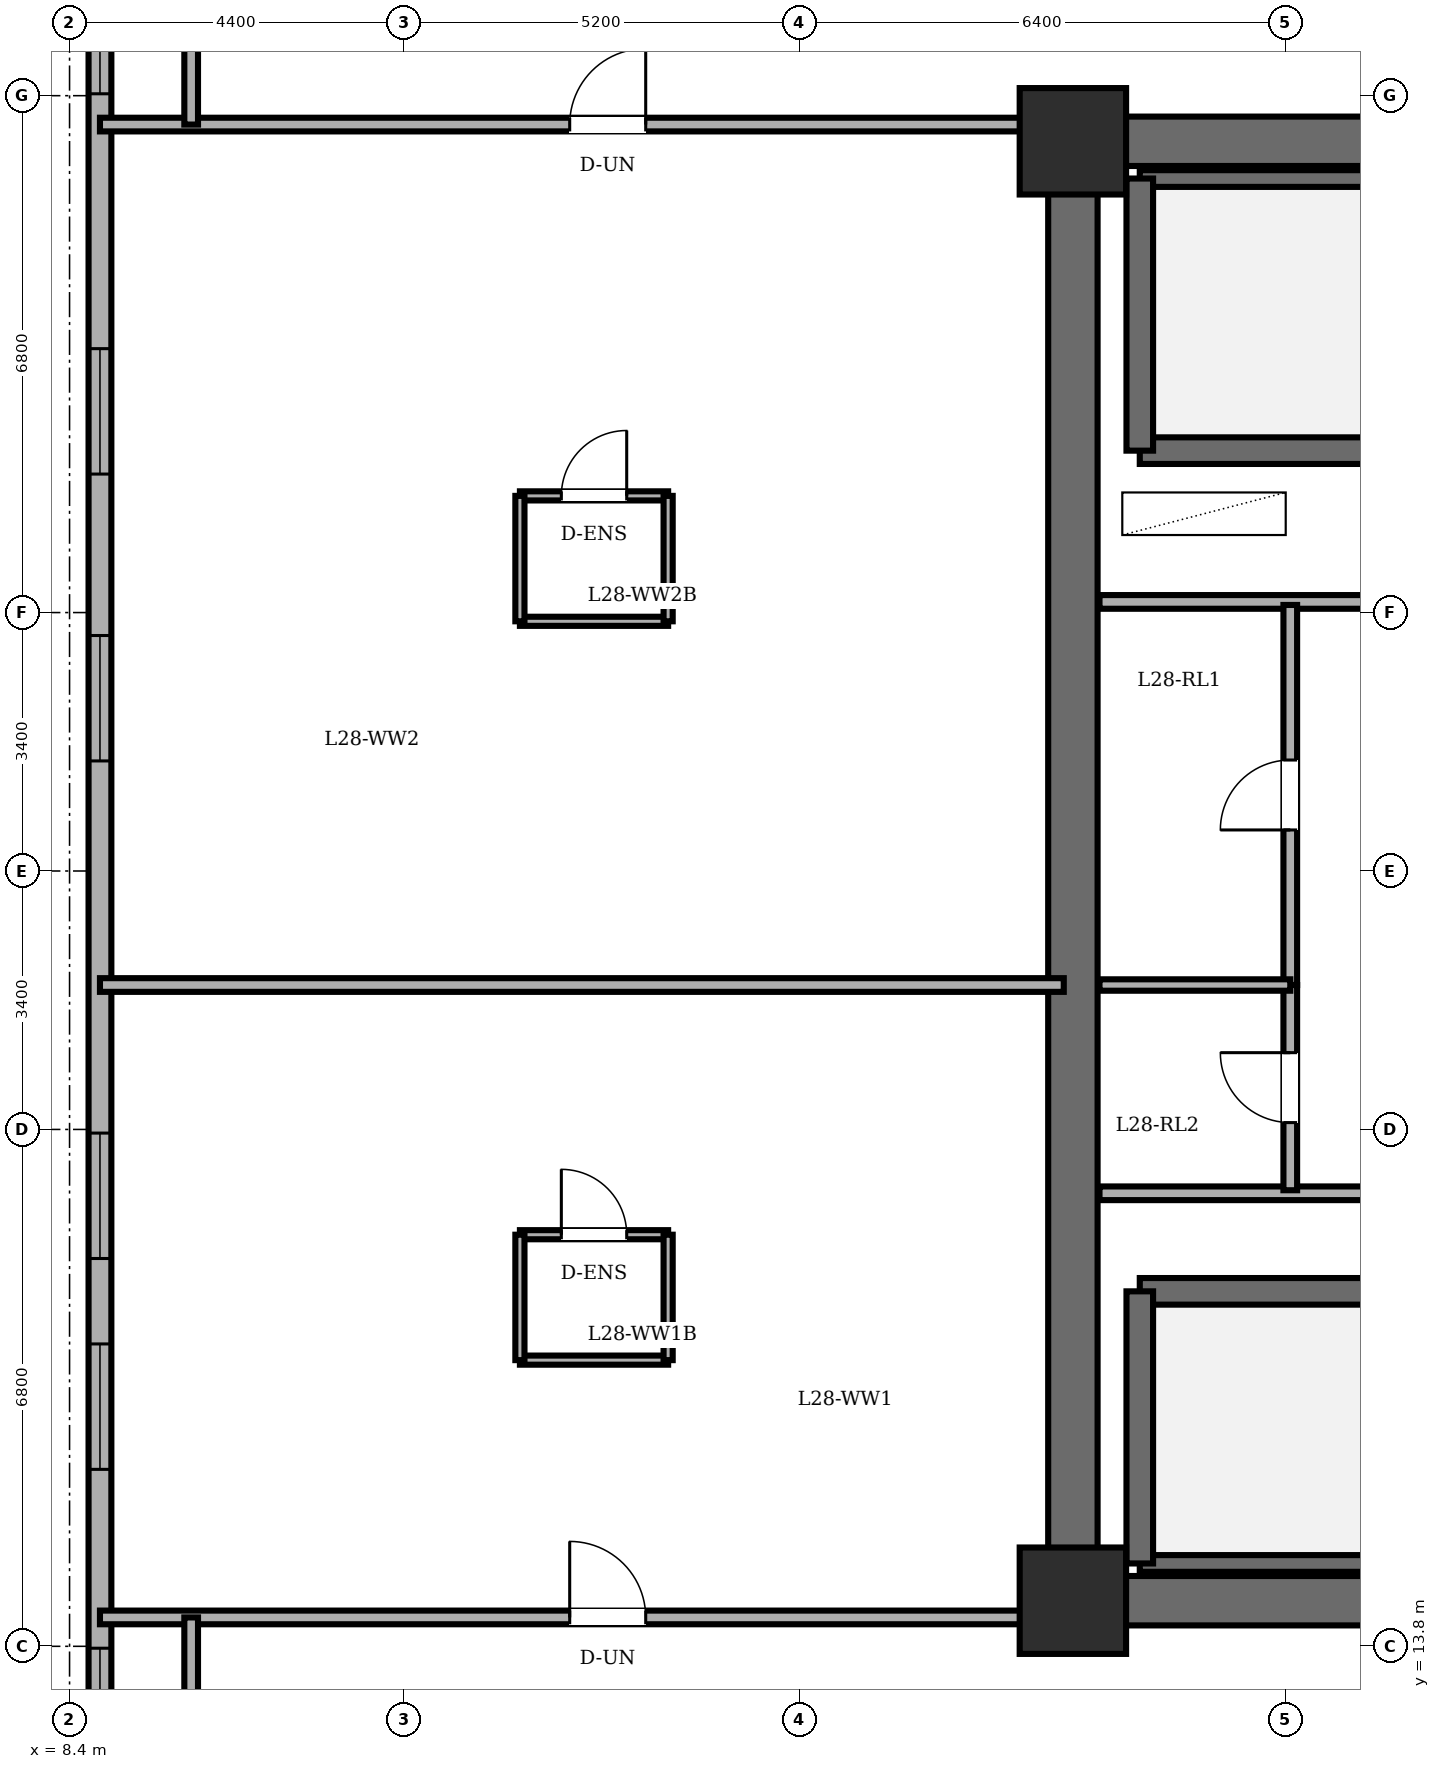
"""IFC4 building model, lengths in metres.
Left out: names, types, materials, properties, quantities, classifications, styles, units other than length and angle.
Written with IfcOpenShell. Run it as: python <this file> out.ifc"""

import sys

from ifc_helpers import new_model, si_unit, direction, frame, frame_2d, origin, origin_2d, place, context, subcontext, project, spatial, rectangle, extrude, element, fill, save


model = new_model("IFC4")
c1 = context("Model", 3, precision=1e-05, world=origin(), true_north=direction((0.0, 1.0)))
c2 = subcontext(c1, "Body", "Model", "MODEL_VIEW")
j1 = project(units=[si_unit("LENGTHUNIT", "METRE"), si_unit("PLANEANGLEUNIT", "RADIAN")], contexts=[c1])
p1 = place(None, origin())
s1 = spatial("IfcSite", under=j1, at=p1, CompositionType="ELEMENT")
p2 = place(p1, origin())
s2 = spatial("IfcBuilding", under=s1, at=p2, CompositionType="ELEMENT")
p3 = place(p2, frame((0.0, 0.0, 107.9)))
s3 = spatial("IfcBuildingStorey", under=s2, at=p3, CompositionType="ELEMENT", Elevation=107.9)
for number, where, z_axis, x_axis in (
    (1, (21.6, 14.4, 0.0), (0.0, 0.0, 1.0), (1.0, 0.0, 0.0)),
    (2, (21.6, 33.6, 0.0), (0.0, 0.0, 1.0), (1.0, 0.0, 0.0)),
):
    element("IfcColumn", number, at=place(p3, frame(where, z_axis=z_axis, x_axis=x_axis)), inside=s3, PredefinedType="COLUMN", context=c2, shape_type="SweptSolid", body=[
        extrude(rectangle(XDim=1.4, YDim=1.4, at=origin_2d()), origin(), (0.0, 0.0, 1.0), 3.6),
    ])
p4 = place(p3, frame((8.8, 38.2, 0.0), z_axis=(0.0, 0.0, 1.0), x_axis=(0.0, -1.0, 0.0)))
e3 = element("IfcWall", 3, at=p4, inside=s3, PredefinedType="SOLIDWALL", context=c2, shape_type="SweptSolid", body=[
    extrude(rectangle(XDim=28.4, YDim=0.3, at=frame_2d((14.2, 0.0))), origin(), (0.0, 0.0, 1.0), 3.4),
])
p5 = place(p4, frame((2.325, 0.0, 0.85)))
e4 = element("IfcOpeningElement", 4, at=p5, cuts=e3, PredefinedType="OPENING", context=c2, shape_type="SweptSolid", body=[
    extrude(rectangle(XDim=1.65, YDim=1.55, at=frame_2d((0.825, 0.775))), frame((0.0, 0.16, 0.0), z_axis=(0.0, -1.0, 0.0), x_axis=(1.0, 0.0, 0.0)), (0.0, 0.0, 1.0), 0.32),
])
p6 = place(p4, frame((7.328, 0.0, 0.85)))
e5 = element("IfcOpeningElement", 5, at=p6, cuts=e3, PredefinedType="OPENING", context=c2, shape_type="SweptSolid", body=[
    extrude(rectangle(XDim=1.65, YDim=1.55, at=frame_2d((0.825, 0.775))), frame((0.0, 0.16, 0.0), z_axis=(0.0, -1.0, 0.0), x_axis=(1.0, 0.0, 0.0)), (0.0, 0.0, 1.0), 0.32),
])
p7 = place(p4, frame((11.102, 0.0, 0.85)))
e6 = element("IfcOpeningElement", 6, at=p7, cuts=e3, PredefinedType="OPENING", context=c2, shape_type="SweptSolid", body=[
    extrude(rectangle(XDim=1.65, YDim=1.55, at=frame_2d((0.825, 0.775))), frame((0.0, 0.16, 0.0), z_axis=(0.0, -1.0, 0.0), x_axis=(1.0, 0.0, 0.0)), (0.0, 0.0, 1.0), 0.32),
])
p8 = place(p4, frame((17.648, 0.0, 0.85)))
e7 = element("IfcOpeningElement", 7, at=p8, cuts=e3, PredefinedType="OPENING", context=c2, shape_type="SweptSolid", body=[
    extrude(rectangle(XDim=1.65, YDim=1.55, at=frame_2d((0.825, 0.775))), frame((0.0, 0.16, 0.0), z_axis=(0.0, -1.0, 0.0), x_axis=(1.0, 0.0, 0.0)), (0.0, 0.0, 1.0), 0.32),
])
p9 = place(p4, frame((20.422, 0.0, 0.85)))
e8 = element("IfcOpeningElement", 8, at=p9, cuts=e3, PredefinedType="OPENING", context=c2, shape_type="SweptSolid", body=[
    extrude(rectangle(XDim=1.65, YDim=1.55, at=frame_2d((0.825, 0.775))), frame((0.0, 0.16, 0.0), z_axis=(0.0, -1.0, 0.0), x_axis=(1.0, 0.0, 0.0)), (0.0, 0.0, 1.0), 0.32),
])
p10 = place(p4, frame((24.425, 0.0, 0.85)))
e9 = element("IfcOpeningElement", 9, at=p10, cuts=e3, PredefinedType="OPENING", context=c2, shape_type="SweptSolid", body=[
    extrude(rectangle(XDim=1.65, YDim=1.55, at=frame_2d((0.825, 0.775))), frame((0.0, 0.16, 0.0), z_axis=(0.0, -1.0, 0.0), x_axis=(1.0, 0.0, 0.0)), (0.0, 0.0, 1.0), 0.32),
])
p11 = place(p3, frame((21.6, 14.4, 0.0), z_axis=(0.0, 0.0, 1.0), x_axis=(0.0, 1.0, 0.0)))
e10 = element("IfcWall", 10, at=p11, inside=s3, PredefinedType="SHEAR", context=c2, shape_type="SweptSolid", body=[
    extrude(rectangle(XDim=19.2, YDim=0.65, at=frame_2d((9.6, 0.0))), origin(), (0.0, 0.0, 1.0), 3.4),
])
for number, where, z_axis, x_axis in (
    (11, (21.6, 33.6, 0.0), (0.0, 0.0, 1.0), (1.0, 0.0, 0.0)),
    (12, (37.2, 14.4, 0.0), (0.0, 0.0, 1.0), (-1.0, 0.0, 0.0)),
):
    element("IfcWall", number, at=place(p3, frame(where, z_axis=z_axis, x_axis=x_axis)), inside=s3, PredefinedType="SHEAR", context=c2, shape_type="SweptSolid", body=[
        extrude(rectangle(XDim=15.6, YDim=0.65, at=frame_2d((7.8, 0.0))), origin(), (0.0, 0.0, 1.0), 3.4),
    ])
p12 = place(p3, frame((22.48, 29.53, 0.0), z_axis=(0.0, 0.0, 1.0), x_axis=(1.0, 0.0, 0.0)))
e13 = element("IfcWall", 13, at=p12, inside=s3, PredefinedType="SOLIDWALL", context=c2, shape_type="SweptSolid", body=[
    extrude(rectangle(XDim=7.79, YDim=0.35, at=frame_2d((3.895, 0.0))), origin(), (0.0, 0.0, 1.0), 3.4),
])
p13 = place(p3, frame((22.48, 33.11, 0.0), z_axis=(0.0, 0.0, 1.0), x_axis=(1.0, 0.0, 0.0)))
e14 = element("IfcWall", 14, at=p13, inside=s3, PredefinedType="PARTITIONING", context=c2, shape_type="SweptSolid", body=[
    extrude(rectangle(XDim=7.79, YDim=0.22, at=frame_2d((3.895, 0.0))), origin(), (0.0, 0.0, 1.0), 3.4),
])
p14 = place(p3, frame((22.48, 29.53, 0.0), z_axis=(0.0, 0.0, 1.0), x_axis=(0.0, 1.0, 0.0)))
e15 = element("IfcWall", 15, at=p14, inside=s3, PredefinedType="SOLIDWALL", context=c2, shape_type="SweptSolid", body=[
    extrude(rectangle(XDim=3.58, YDim=0.35, at=frame_2d((1.79, 0.0))), origin(), (0.0, 0.0, 1.0), 3.4),
])
p15 = place(p3, frame((22.48, 18.47, 0.0), z_axis=(0.0, 0.0, 1.0), x_axis=(1.0, 0.0, 0.0)))
e16 = element("IfcWall", 16, at=p15, inside=s3, PredefinedType="SOLIDWALL", context=c2, shape_type="SweptSolid", body=[
    extrude(rectangle(XDim=7.79, YDim=0.35, at=frame_2d((3.895, 0.0))), origin(), (0.0, 0.0, 1.0), 3.4),
])
p16 = place(p3, frame((22.48, 14.89, 0.0), z_axis=(0.0, 0.0, 1.0), x_axis=(1.0, 0.0, 0.0)))
e17 = element("IfcWall", 17, at=p16, inside=s3, PredefinedType="PARTITIONING", context=c2, shape_type="SweptSolid", body=[
    extrude(rectangle(XDim=7.79, YDim=0.22, at=frame_2d((3.895, 0.0))), origin(), (0.0, 0.0, 1.0), 3.4),
])
p17 = place(p3, frame((22.48, 14.89, 0.0), z_axis=(0.0, 0.0, 1.0), x_axis=(0.0, 1.0, 0.0)))
e18 = element("IfcWall", 18, at=p17, inside=s3, PredefinedType="SOLIDWALL", context=c2, shape_type="SweptSolid", body=[
    extrude(rectangle(XDim=3.58, YDim=0.35, at=frame_2d((1.79, 0.0))), origin(), (0.0, 0.0, 1.0), 3.4),
])
p18 = place(p3, frame((21.95, 27.54, 0.0), z_axis=(0.0, 0.0, 1.0), x_axis=(1.0, 0.0, 0.0)))
e19 = element("IfcWall", 19, at=p18, inside=s3, PredefinedType="PARTITIONING", context=c2, shape_type="SweptSolid", body=[
    extrude(rectangle(XDim=10.56, YDim=0.18, at=frame_2d((5.28, 0.0))), origin(), (0.0, 0.0, 1.0), 3.4),
])
p19 = place(p3, frame((21.95, 19.76, 0.0), z_axis=(0.0, 0.0, 1.0), x_axis=(1.0, 0.0, 0.0)))
e20 = element("IfcWall", 20, at=p19, inside=s3, PredefinedType="PARTITIONING", context=c2, shape_type="SweptSolid", body=[
    extrude(rectangle(XDim=14.87, YDim=0.18, at=frame_2d((7.435, 0.0))), origin(), (0.0, 0.0, 1.0), 3.4),
])
p20 = place(p3, frame((24.46, 22.5, 0.0), z_axis=(0.0, 0.0, 1.0), x_axis=(0.0, 1.0, 0.0)))
e21 = element("IfcWall", 21, at=p20, inside=s3, PredefinedType="PARTITIONING", context=c2, shape_type="SweptSolid", body=[
    extrude(rectangle(XDim=5.0, YDim=0.18, at=frame_2d((2.5, 0.0))), origin(), (0.0, 0.0, 1.0), 3.4),
])
p21 = place(p20, frame((2.04, 0.0, 0.0)))
e22 = element("IfcOpeningElement", 22, at=p21, cuts=e21, PredefinedType="OPENING", context=c2, shape_type="SweptSolid", body=[
    extrude(rectangle(XDim=0.92, YDim=2.1, at=frame_2d((0.46, 1.05))), frame((0.0, 0.1, 0.0), z_axis=(0.0, -1.0, 0.0), x_axis=(1.0, 0.0, 0.0)), (0.0, 0.0, 1.0), 0.2),
])
p22 = place(p3, frame((24.46, 19.8, 0.0), z_axis=(0.0, 0.0, 1.0), x_axis=(0.0, 1.0, 0.0)))
e23 = element("IfcWall", 23, at=p22, inside=s3, PredefinedType="PARTITIONING", context=c2, shape_type="SweptSolid", body=[
    extrude(rectangle(XDim=2.7, YDim=0.18, at=frame_2d((1.35, 0.0))), origin(), (0.0, 0.0, 1.0), 3.4),
])
p23 = place(p22, frame((0.89, 0.0, 0.0)))
e24 = element("IfcOpeningElement", 24, at=p23, cuts=e23, PredefinedType="OPENING", context=c2, shape_type="SweptSolid", body=[
    extrude(rectangle(XDim=0.92, YDim=2.1, at=frame_2d((0.46, 1.05))), frame((0.0, 0.1, 0.0), z_axis=(0.0, -1.0, 0.0), x_axis=(1.0, 0.0, 0.0)), (0.0, 0.0, 1.0), 0.2),
])
p24 = place(p3, frame((21.95, 22.5, 0.0), z_axis=(0.0, 0.0, 1.0), x_axis=(1.0, 0.0, 0.0)))
e25 = element("IfcWall", 25, at=p24, inside=s3, PredefinedType="PARTITIONING", context=c2, shape_type="SweptSolid", body=[
    extrude(rectangle(XDim=2.51, YDim=0.15, at=frame_2d((1.255, 0.0))), origin(), (0.0, 0.0, 1.0), 3.4),
])
p25 = place(p3, frame((14.325, 19.215, 0.0), z_axis=(0.0, 0.0, 1.0), x_axis=(1.0, 0.0, 0.0)))
e26 = element("IfcWall", 26, at=p25, inside=s3, PredefinedType="PARTITIONING", context=c2, shape_type="SweptSolid", body=[
    extrude(rectangle(XDim=1.95, YDim=0.12, at=frame_2d((0.975, 0.0))), origin(), (0.0, 0.0, 1.0), 3.4),
])
p26 = place(p25, frame((0.545, 0.0, 0.0)))
e27 = element("IfcOpeningElement", 27, at=p26, cuts=e26, PredefinedType="OPENING", context=c2, shape_type="SweptSolid", body=[
    extrude(rectangle(XDim=0.86, YDim=2.1, at=frame_2d((0.43, 1.05))), frame((0.0, 0.07, 0.0), z_axis=(0.0, -1.0, 0.0), x_axis=(1.0, 0.0, 0.0)), (0.0, 0.0, 1.0), 0.14),
])
p27 = place(p3, frame((16.275, 17.565, 0.0), z_axis=(0.0, 0.0, 1.0), x_axis=(-1.0, 0.0, 0.0)))
e28 = element("IfcWall", 28, at=p27, inside=s3, PredefinedType="PARTITIONING", context=c2, shape_type="SweptSolid", body=[
    extrude(rectangle(XDim=1.95, YDim=0.12, at=frame_2d((0.975, 0.0))), origin(), (0.0, 0.0, 1.0), 3.4),
])
for number, where, z_axis, x_axis in (
    (29, (14.325, 19.215, 0.0), (0.0, 0.0, 1.0), (0.0, -1.0, 0.0)),
    (30, (16.275, 17.565, 0.0), (0.0, 0.0, 1.0), (0.0, 1.0, 0.0)),
):
    element("IfcWall", number, at=place(p3, frame(where, z_axis=z_axis, x_axis=x_axis)), inside=s3, PredefinedType="PARTITIONING", context=c2, shape_type="SweptSolid", body=[
        extrude(rectangle(XDim=1.65, YDim=0.12, at=frame_2d((0.825, 0.0))), origin(), (0.0, 0.0, 1.0), 3.4),
    ])
p28 = place(p3, frame((14.325, 28.935, 0.0), z_axis=(0.0, 0.0, 1.0), x_axis=(1.0, 0.0, 0.0)))
e31 = element("IfcWall", 31, at=p28, inside=s3, PredefinedType="PARTITIONING", context=c2, shape_type="SweptSolid", body=[
    extrude(rectangle(XDim=1.95, YDim=0.12, at=frame_2d((0.975, 0.0))), origin(), (0.0, 0.0, 1.0), 3.4),
])
p29 = place(p28, frame((0.545, 0.0, 0.0)))
e32 = element("IfcOpeningElement", 32, at=p29, cuts=e31, PredefinedType="OPENING", context=c2, shape_type="SweptSolid", body=[
    extrude(rectangle(XDim=0.86, YDim=2.1, at=frame_2d((0.43, 1.05))), frame((0.0, 0.07, 0.0), z_axis=(0.0, -1.0, 0.0), x_axis=(1.0, 0.0, 0.0)), (0.0, 0.0, 1.0), 0.14),
])
p30 = place(p3, frame((16.275, 27.285, 0.0), z_axis=(0.0, 0.0, 1.0), x_axis=(-1.0, 0.0, 0.0)))
e33 = element("IfcWall", 33, at=p30, inside=s3, PredefinedType="PARTITIONING", context=c2, shape_type="SweptSolid", body=[
    extrude(rectangle(XDim=1.95, YDim=0.12, at=frame_2d((0.975, 0.0))), origin(), (0.0, 0.0, 1.0), 3.4),
])
for number, where, z_axis, x_axis in (
    (34, (14.325, 28.935, 0.0), (0.0, 0.0, 1.0), (0.0, -1.0, 0.0)),
    (35, (16.275, 27.285, 0.0), (0.0, 0.0, 1.0), (0.0, 1.0, 0.0)),
):
    element("IfcWall", number, at=place(p3, frame(where, z_axis=z_axis, x_axis=x_axis)), inside=s3, PredefinedType="PARTITIONING", context=c2, shape_type="SweptSolid", body=[
        extrude(rectangle(XDim=1.65, YDim=0.12, at=frame_2d((0.825, 0.0))), origin(), (0.0, 0.0, 1.0), 3.4),
    ])
p31 = place(p3, frame((8.8, 14.18, 0.0), z_axis=(0.0, 0.0, 1.0), x_axis=(1.0, 0.0, 0.0)))
e36 = element("IfcWall", 36, at=p31, inside=s3, PredefinedType="PARTITIONING", context=c2, shape_type="SweptSolid", body=[
    extrude(rectangle(XDim=12.68, YDim=0.18, at=frame_2d((6.34, 0.0))), origin(), (0.0, 0.0, 1.0), 3.4),
])
p32 = place(p31, frame((6.18, 0.0, 0.0)))
e37 = element("IfcOpeningElement", 37, at=p32, cuts=e36, PredefinedType="OPENING", context=c2, shape_type="SweptSolid", body=[
    extrude(rectangle(XDim=1.0, YDim=2.15, at=frame_2d((0.5, 1.075))), frame((0.0, 0.1, 0.0), z_axis=(0.0, -1.0, 0.0), x_axis=(1.0, 0.0, 0.0)), (0.0, 0.0, 1.0), 0.2),
])
p33 = place(p3, frame((8.8, 22.5, 0.0), z_axis=(0.0, 0.0, 1.0), x_axis=(1.0, 0.0, 0.0)))
e38 = element("IfcWall", 38, at=p33, inside=s3, PredefinedType="PARTITIONING", context=c2, shape_type="SweptSolid", body=[
    extrude(rectangle(XDim=12.68, YDim=0.18, at=frame_2d((6.34, 0.0))), origin(), (0.0, 0.0, 1.0), 3.4),
])
p34 = place(p3, frame((8.8, 33.82, 0.0), z_axis=(0.0, 0.0, 1.0), x_axis=(1.0, 0.0, 0.0)))
e39 = element("IfcWall", 39, at=p34, inside=s3, PredefinedType="PARTITIONING", context=c2, shape_type="SweptSolid", body=[
    extrude(rectangle(XDim=12.68, YDim=0.18, at=frame_2d((6.34, 0.0))), origin(), (0.0, 0.0, 1.0), 3.4),
])
p35 = place(p34, frame((6.18, 0.0, 0.0)))
e40 = element("IfcOpeningElement", 40, at=p35, cuts=e39, PredefinedType="OPENING", context=c2, shape_type="SweptSolid", body=[
    extrude(rectangle(XDim=1.0, YDim=2.15, at=frame_2d((0.5, 1.075))), frame((0.0, 0.1, 0.0), z_axis=(0.0, -1.0, 0.0), x_axis=(1.0, 0.0, 0.0)), (0.0, 0.0, 1.0), 0.2),
])
for number, where, z_axis, x_axis in (
    (41, (10.0, 11.72, 0.0), (0.0, 0.0, 1.0), (0.0, 1.0, 0.0)),
    (42, (10.0, 33.82, 0.0), (0.0, 0.0, 1.0), (0.0, 1.0, 0.0)),
):
    element("IfcWall", number, at=place(p3, frame(where, z_axis=z_axis, x_axis=x_axis)), inside=s3, PredefinedType="PARTITIONING", context=c2, shape_type="SweptSolid", body=[
        extrude(rectangle(XDim=2.46, YDim=0.18, at=frame_2d((1.23, 0.0))), origin(), (0.0, 0.0, 1.0), 3.4),
    ])
p36 = place(p5, origin())
e43 = element("IfcWindow", 43, at=p36, inside=s3, PartitioningType="DOUBLE_PANEL_VERTICAL", PredefinedType="WINDOW", context=c2, shape_type="SweptSolid", body=[
    extrude(rectangle(XDim=1.65, YDim=1.55, at=frame_2d((0.825, 0.775))), frame((0.0, 0.03, 0.0), z_axis=(0.0, -1.0, 0.0), x_axis=(1.0, 0.0, 0.0)), (0.0, 0.0, 1.0), 0.06),
])
fill(e4, e43)
p37 = place(p6, origin())
e44 = element("IfcWindow", 44, at=p37, inside=s3, PartitioningType="DOUBLE_PANEL_VERTICAL", PredefinedType="WINDOW", context=c2, shape_type="SweptSolid", body=[
    extrude(rectangle(XDim=1.65, YDim=1.55, at=frame_2d((0.825, 0.775))), frame((0.0, 0.03, 0.0), z_axis=(0.0, -1.0, 0.0), x_axis=(1.0, 0.0, 0.0)), (0.0, 0.0, 1.0), 0.06),
])
fill(e5, e44)
p38 = place(p7, origin())
e45 = element("IfcWindow", 45, at=p38, inside=s3, PartitioningType="DOUBLE_PANEL_VERTICAL", PredefinedType="WINDOW", context=c2, shape_type="SweptSolid", body=[
    extrude(rectangle(XDim=1.65, YDim=1.55, at=frame_2d((0.825, 0.775))), frame((0.0, 0.03, 0.0), z_axis=(0.0, -1.0, 0.0), x_axis=(1.0, 0.0, 0.0)), (0.0, 0.0, 1.0), 0.06),
])
fill(e6, e45)
p39 = place(p8, origin())
e46 = element("IfcWindow", 46, at=p39, inside=s3, PartitioningType="DOUBLE_PANEL_VERTICAL", PredefinedType="WINDOW", context=c2, shape_type="SweptSolid", body=[
    extrude(rectangle(XDim=1.65, YDim=1.55, at=frame_2d((0.825, 0.775))), frame((0.0, 0.03, 0.0), z_axis=(0.0, -1.0, 0.0), x_axis=(1.0, 0.0, 0.0)), (0.0, 0.0, 1.0), 0.06),
])
fill(e7, e46)
p40 = place(p9, origin())
e47 = element("IfcWindow", 47, at=p40, inside=s3, PartitioningType="DOUBLE_PANEL_VERTICAL", PredefinedType="WINDOW", context=c2, shape_type="SweptSolid", body=[
    extrude(rectangle(XDim=1.65, YDim=1.55, at=frame_2d((0.825, 0.775))), frame((0.0, 0.03, 0.0), z_axis=(0.0, -1.0, 0.0), x_axis=(1.0, 0.0, 0.0)), (0.0, 0.0, 1.0), 0.06),
])
fill(e8, e47)
p41 = place(p10, origin())
e48 = element("IfcWindow", 48, at=p41, inside=s3, PartitioningType="DOUBLE_PANEL_VERTICAL", PredefinedType="WINDOW", context=c2, shape_type="SweptSolid", body=[
    extrude(rectangle(XDim=1.65, YDim=1.55, at=frame_2d((0.825, 0.775))), frame((0.0, 0.03, 0.0), z_axis=(0.0, -1.0, 0.0), x_axis=(1.0, 0.0, 0.0)), (0.0, 0.0, 1.0), 0.06),
])
fill(e9, e48)
p42 = place(p21, origin())
e49 = element("IfcDoor", 49, at=p42, inside=s3, OperationType="SINGLE_SWING_LEFT", PredefinedType="DOOR", context=c2, shape_type="SweptSolid", body=[
    extrude(rectangle(XDim=0.92, YDim=2.1, at=frame_2d((0.46, 1.05))), frame((0.0, 0.025, 0.0), z_axis=(0.0, -1.0, 0.0), x_axis=(1.0, 0.0, 0.0)), (0.0, 0.0, 1.0), 0.05),
])
fill(e22, e49)
p43 = place(p23, origin())
e50 = element("IfcDoor", 50, at=p43, inside=s3, OperationType="SINGLE_SWING_RIGHT", PredefinedType="DOOR", context=c2, shape_type="SweptSolid", body=[
    extrude(rectangle(XDim=0.92, YDim=2.1, at=frame_2d((0.46, 1.05))), frame((0.0, 0.025, 0.0), z_axis=(0.0, -1.0, 0.0), x_axis=(1.0, 0.0, 0.0)), (0.0, 0.0, 1.0), 0.05),
])
fill(e24, e50)
p44 = place(p26, origin())
e51 = element("IfcDoor", 51, at=p44, inside=s3, OperationType="SINGLE_SWING_LEFT", PredefinedType="DOOR", context=c2, shape_type="SweptSolid", body=[
    extrude(rectangle(XDim=0.86, YDim=2.1, at=frame_2d((0.43, 1.05))), frame((0.0, 0.025, 0.0), z_axis=(0.0, -1.0, 0.0), x_axis=(1.0, 0.0, 0.0)), (0.0, 0.0, 1.0), 0.05),
])
fill(e27, e51)
p45 = place(p29, origin())
e52 = element("IfcDoor", 52, at=p45, inside=s3, OperationType="SINGLE_SWING_RIGHT", PredefinedType="DOOR", context=c2, shape_type="SweptSolid", body=[
    extrude(rectangle(XDim=0.86, YDim=2.1, at=frame_2d((0.43, 1.05))), frame((0.0, 0.025, 0.0), z_axis=(0.0, -1.0, 0.0), x_axis=(1.0, 0.0, 0.0)), (0.0, 0.0, 1.0), 0.05),
])
fill(e32, e52)
p46 = place(p32, origin())
e53 = element("IfcDoor", 53, at=p46, inside=s3, OperationType="SINGLE_SWING_LEFT", PredefinedType="DOOR", context=c2, shape_type="SweptSolid", body=[
    extrude(rectangle(XDim=1.0, YDim=2.15, at=frame_2d((0.5, 1.075))), frame((0.0, 0.025, 0.0), z_axis=(0.0, -1.0, 0.0), x_axis=(1.0, 0.0, 0.0)), (0.0, 0.0, 1.0), 0.05),
])
fill(e37, e53)
p47 = place(p35, origin())
e54 = element("IfcDoor", 54, at=p47, inside=s3, OperationType="SINGLE_SWING_RIGHT", PredefinedType="DOOR", context=c2, shape_type="SweptSolid", body=[
    extrude(rectangle(XDim=1.0, YDim=2.15, at=frame_2d((0.5, 1.075))), frame((0.0, 0.025, 0.0), z_axis=(0.0, -1.0, 0.0), x_axis=(1.0, 0.0, 0.0)), (0.0, 0.0, 1.0), 0.05),
])
fill(e40, e54)
save(model, sys.argv[1])
